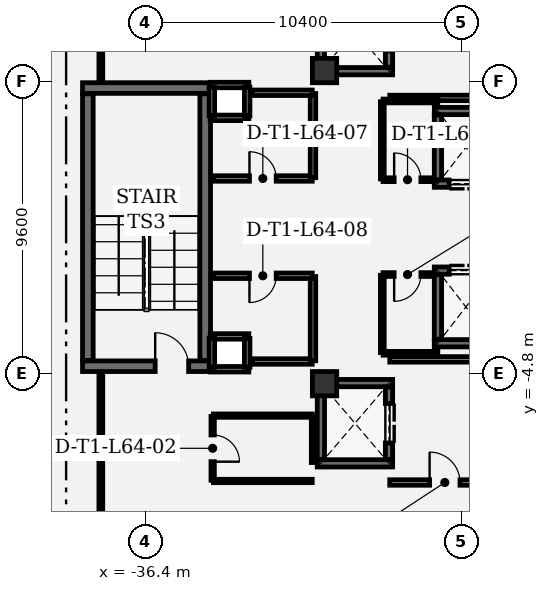
"""IFC4 building model, lengths in metres.
Left out: names, types, materials, properties, quantities, classifications, styles, units other than length and angle.
Written with IfcOpenShell. Run it as: python <this file> out.ifc"""

import sys

from ifc_helpers import new_model, si_unit, direction, frame, frame_2d, origin, origin_2d, place, context, subcontext, project, spatial, rectangle, extrude, element, fill, save


model = new_model("IFC4")
c1 = context("Model", 3, precision=1e-05, world=origin(), true_north=direction((0.0, 1.0)))
c2 = subcontext(c1, "Body", "Model", "MODEL_VIEW")
j1 = project(units=[si_unit("LENGTHUNIT", "METRE"), si_unit("PLANEANGLEUNIT", "RADIAN")], contexts=[c1])
p1 = place(None, origin())
s1 = spatial("IfcSite", under=j1, at=p1, CompositionType="ELEMENT")
p2 = place(p1, origin())
s2 = spatial("IfcBuilding", under=s1, at=p2, CompositionType="ELEMENT")
p3 = place(p2, frame((0.0, 0.0, 276.6)))
s3 = spatial("IfcBuildingStorey", under=s2, at=p3, CompositionType="ELEMENT", Elevation=276.6)
for number, where, z_axis, x_axis in (
    (1, (-30.5, 5.15, 0.0), (0.0, 0.0, 1.0), (1.0, 0.0, 0.0)),
    (2, (-30.5, -5.15, 0.0), (0.0, 0.0, 1.0), (1.0, 0.0, 0.0)),
):
    element("IfcColumn", number, at=place(p3, frame(where, z_axis=z_axis, x_axis=x_axis)), inside=s3, PredefinedType="COLUMN", context=c2, shape_type="SweptSolid", body=[
        extrude(rectangle(XDim=0.8, YDim=0.8, at=origin_2d()), origin(), (0.0, 0.0, 1.0), 4.2),
    ])
p4 = place(p3, frame((-38.46, -4.575, 0.0), z_axis=(0.0, 0.0, 1.0), x_axis=(1.0, 0.0, 0.0)))
e3 = element("IfcWall", 3, at=p4, inside=s3, PredefinedType="SHEAR", context=c2, shape_type="SweptSolid", body=[
    extrude(rectangle(XDim=4.21, YDim=0.35, at=frame_2d((2.105, 0.0))), origin(), (0.0, 0.0, 1.0), 3.91),
])
p5 = place(p4, frame((2.39, 0.0, 0.0)))
e4 = element("IfcOpeningElement", 4, at=p5, cuts=e3, PredefinedType="OPENING", context=c2, shape_type="SweptSolid", body=[
    extrude(rectangle(XDim=1.1, YDim=2.2, at=frame_2d((0.55, 1.1))), frame((0.0, 0.185, 0.0), z_axis=(0.0, -1.0, 0.0), x_axis=(1.0, 0.0, 0.0)), (0.0, 0.0, 1.0), 0.37),
])
p6 = place(p3, frame((-34.25, 4.575, 0.0), z_axis=(0.0, 0.0, 1.0), x_axis=(-1.0, 0.0, 0.0)))
e5 = element("IfcWall", 5, at=p6, inside=s3, PredefinedType="SHEAR", context=c2, shape_type="SweptSolid", body=[
    extrude(rectangle(XDim=4.21, YDim=0.35, at=frame_2d((2.105, 0.0))), origin(), (0.0, 0.0, 1.0), 3.91),
])
for number, where, z_axis, x_axis in (
    (6, (-34.425, -4.385, 0.0), (0.0, 0.0, 1.0), (0.0, 1.0, 0.0)),
    (7, (-38.285, 4.385, 0.0), (0.0, 0.0, 1.0), (0.0, -1.0, 0.0)),
):
    element("IfcWall", number, at=place(p3, frame(where, z_axis=z_axis, x_axis=x_axis)), inside=s3, PredefinedType="SHEAR", context=c2, shape_type="SweptSolid", body=[
        extrude(rectangle(XDim=8.77, YDim=0.35, at=frame_2d((4.385, 0.0))), origin(), (0.0, 0.0, 1.0), 3.91),
    ])
p7 = place(p3, frame((-28.26, 5.13, 0.0), z_axis=(0.0, 0.0, 1.0), x_axis=(-1.0, 0.0, 0.0)))
e8 = element("IfcWall", 8, at=p7, inside=s3, PredefinedType="SHEAR", context=c2, shape_type="SweptSolid", body=[
    extrude(rectangle(XDim=2.48, YDim=0.24, at=frame_2d((1.24, 0.0))), origin(), (0.0, 0.0, 1.0), 3.91),
])
p8 = place(p3, frame((-30.62, 5.262, 0.0), z_axis=(0.0, 0.0, 1.0), x_axis=(0.0, 1.0, 0.0)))
e9 = element("IfcWall", 9, at=p8, inside=s3, PredefinedType="SHEAR", context=c2, shape_type="SweptSolid", body=[
    extrude(rectangle(XDim=2.376, YDim=0.24, at=frame_2d((1.188, 0.0))), origin(), (0.0, 0.0, 1.0), 3.91),
])
p9 = place(p3, frame((-28.38, 7.638, 0.0), z_axis=(0.0, 0.0, 1.0), x_axis=(0.0, -1.0, 0.0)))
e10 = element("IfcWall", 10, at=p9, inside=s3, PredefinedType="SHEAR", context=c2, shape_type="SweptSolid", body=[
    extrude(rectangle(XDim=2.376, YDim=0.24, at=frame_2d((1.188, 0.0))), origin(), (0.0, 0.0, 1.0), 3.91),
])
p10 = place(p9, frame((0.538, 0.0, 0.0)))
e11 = element("IfcOpeningElement", 11, at=p10, cuts=e10, PredefinedType="OPENING", context=c2, shape_type="SweptSolid", body=[
    extrude(rectangle(XDim=1.3, YDim=2.3, at=frame_2d((0.65, 1.15))), frame((0.0, 0.13, 0.0), z_axis=(0.0, -1.0, 0.0), x_axis=(1.0, 0.0, 0.0)), (0.0, 0.0, 1.0), 0.26),
])
for number, where, z_axis, x_axis in (
    (12, (-28.26, -7.77, 0.0), (0.0, 0.0, 1.0), (-1.0, 0.0, 0.0)),
    (13, (-30.74, -5.13, 0.0), (0.0, 0.0, 1.0), (1.0, 0.0, 0.0)),
):
    element("IfcWall", number, at=place(p3, frame(where, z_axis=z_axis, x_axis=x_axis)), inside=s3, PredefinedType="SHEAR", context=c2, shape_type="SweptSolid", body=[
        extrude(rectangle(XDim=2.48, YDim=0.24, at=frame_2d((1.24, 0.0))), origin(), (0.0, 0.0, 1.0), 3.91),
    ])
p11 = place(p3, frame((-30.62, -7.638, 0.0), z_axis=(0.0, 0.0, 1.0), x_axis=(0.0, 1.0, 0.0)))
e14 = element("IfcWall", 14, at=p11, inside=s3, PredefinedType="SHEAR", context=c2, shape_type="SweptSolid", body=[
    extrude(rectangle(XDim=2.376, YDim=0.24, at=frame_2d((1.188, 0.0))), origin(), (0.0, 0.0, 1.0), 3.91),
])
p12 = place(p3, frame((-28.38, -5.262, 0.0), z_axis=(0.0, 0.0, 1.0), x_axis=(0.0, -1.0, 0.0)))
e15 = element("IfcWall", 15, at=p12, inside=s3, PredefinedType="SHEAR", context=c2, shape_type="SweptSolid", body=[
    extrude(rectangle(XDim=2.376, YDim=0.24, at=frame_2d((1.188, 0.0))), origin(), (0.0, 0.0, 1.0), 3.91),
])
p13 = place(p12, frame((0.538, 0.0, 0.0)))
e16 = element("IfcOpeningElement", 16, at=p13, cuts=e15, PredefinedType="OPENING", context=c2, shape_type="SweptSolid", body=[
    extrude(rectangle(XDim=1.3, YDim=2.3, at=frame_2d((0.65, 1.15))), frame((0.0, 0.13, 0.0), z_axis=(0.0, -1.0, 0.0), x_axis=(1.0, 0.0, 0.0)), (0.0, 0.0, 1.0), 0.26),
])
p14 = place(p3, frame((-24.81, 1.43, 0.0), z_axis=(0.0, 0.0, 1.0), x_axis=(-1.0, 0.0, 0.0)))
e17 = element("IfcWall", 17, at=p14, inside=s3, PredefinedType="SHEAR", context=c2, shape_type="SweptSolid", body=[
    extrude(rectangle(XDim=2.08, YDim=0.24, at=frame_2d((1.04, 0.0))), origin(), (0.0, 0.0, 1.0), 3.91),
])
p15 = place(p14, frame((0.49, 0.0, 0.0)))
e18 = element("IfcOpeningElement", 18, at=p15, cuts=e17, PredefinedType="OPENING", context=c2, shape_type="SweptSolid", body=[
    extrude(rectangle(XDim=1.1, YDim=2.2, at=frame_2d((0.55, 1.1))), frame((0.0, 0.13, 0.0), z_axis=(0.0, -1.0, 0.0), x_axis=(1.0, 0.0, 0.0)), (0.0, 0.0, 1.0), 0.26),
])
p16 = place(p3, frame((-26.89, 3.82, 0.0), z_axis=(0.0, 0.0, 1.0), x_axis=(1.0, 0.0, 0.0)))
e19 = element("IfcWall", 19, at=p16, inside=s3, PredefinedType="SHEAR", context=c2, shape_type="SweptSolid", body=[
    extrude(rectangle(XDim=2.08, YDim=0.24, at=frame_2d((1.04, 0.0))), origin(), (0.0, 0.0, 1.0), 3.91),
])
p17 = place(p3, frame((-26.77, 1.562, 0.0), z_axis=(0.0, 0.0, 1.0), x_axis=(0.0, 1.0, 0.0)))
e20 = element("IfcWall", 20, at=p17, inside=s3, PredefinedType="SHEAR", context=c2, shape_type="SweptSolid", body=[
    extrude(rectangle(XDim=2.126, YDim=0.24, at=frame_2d((1.063, 0.0))), origin(), (0.0, 0.0, 1.0), 3.91),
])
p18 = place(p3, frame((-24.81, -3.82, 0.0), z_axis=(0.0, 0.0, 1.0), x_axis=(-1.0, 0.0, 0.0)))
e21 = element("IfcWall", 21, at=p18, inside=s3, PredefinedType="SHEAR", context=c2, shape_type="SweptSolid", body=[
    extrude(rectangle(XDim=2.08, YDim=0.24, at=frame_2d((1.04, 0.0))), origin(), (0.0, 0.0, 1.0), 3.91),
])
p19 = place(p3, frame((-26.89, -1.43, 0.0), z_axis=(0.0, 0.0, 1.0), x_axis=(1.0, 0.0, 0.0)))
e22 = element("IfcWall", 22, at=p19, inside=s3, PredefinedType="SHEAR", context=c2, shape_type="SweptSolid", body=[
    extrude(rectangle(XDim=2.08, YDim=0.24, at=frame_2d((1.04, 0.0))), origin(), (0.0, 0.0, 1.0), 3.91),
])
p20 = place(p19, frame((0.49, 0.0, 0.0)))
e23 = element("IfcOpeningElement", 23, at=p20, cuts=e22, PredefinedType="OPENING", context=c2, shape_type="SweptSolid", body=[
    extrude(rectangle(XDim=1.1, YDim=2.2, at=frame_2d((0.55, 1.1))), frame((0.0, 0.13, 0.0), z_axis=(0.0, -1.0, 0.0), x_axis=(1.0, 0.0, 0.0)), (0.0, 0.0, 1.0), 0.26),
])
p21 = place(p3, frame((-26.77, -3.688, 0.0), z_axis=(0.0, 0.0, 1.0), x_axis=(0.0, 1.0, 0.0)))
e24 = element("IfcWall", 24, at=p21, inside=s3, PredefinedType="SHEAR", context=c2, shape_type="SweptSolid", body=[
    extrude(rectangle(XDim=2.126, YDim=0.24, at=frame_2d((1.063, 0.0))), origin(), (0.0, 0.0, 1.0), 3.91),
])
for number, where, z_axis, x_axis in (
    (25, (-32.99, 3.595, 0.0), (0.0, 0.0, 1.0), (-1.0, 0.0, 0.0)),
    (26, (-34.26, 4.675, 0.0), (0.0, 0.0, 1.0), (1.0, 0.0, 0.0)),
):
    element("IfcWall", number, at=place(p3, frame(where, z_axis=z_axis, x_axis=x_axis)), inside=s3, PredefinedType="PARTITIONING", context=c2, shape_type="SweptSolid", body=[
        extrude(rectangle(XDim=1.27, YDim=0.18, at=frame_2d((0.635, 0.0))), origin(), (0.0, 0.0, 1.0), 3.91),
    ])
for number, where, z_axis, x_axis in (
    (27, (-34.205, 3.66, 0.0), (0.0, 0.0, 1.0), (0.0, 1.0, 0.0)),
    (28, (-33.045, 4.61, 0.0), (0.0, 0.0, 1.0), (0.0, -1.0, 0.0)),
):
    element("IfcWall", number, at=place(p3, frame(where, z_axis=z_axis, x_axis=x_axis)), inside=s3, PredefinedType="PARTITIONING", context=c2, shape_type="SweptSolid", body=[
        extrude(rectangle(XDim=0.95, YDim=0.18, at=frame_2d((0.475, 0.0))), origin(), (0.0, 0.0, 1.0), 3.91),
    ])
for number, where, z_axis, x_axis in (
    (29, (-32.99, -4.675, 0.0), (0.0, 0.0, 1.0), (-1.0, 0.0, 0.0)),
    (30, (-34.26, -3.595, 0.0), (0.0, 0.0, 1.0), (1.0, 0.0, 0.0)),
):
    element("IfcWall", number, at=place(p3, frame(where, z_axis=z_axis, x_axis=x_axis)), inside=s3, PredefinedType="PARTITIONING", context=c2, shape_type="SweptSolid", body=[
        extrude(rectangle(XDim=1.27, YDim=0.18, at=frame_2d((0.635, 0.0))), origin(), (0.0, 0.0, 1.0), 3.91),
    ])
for number, where, z_axis, x_axis in (
    (31, (-34.205, -4.61, 0.0), (0.0, 0.0, 1.0), (0.0, 1.0, 0.0)),
    (32, (-33.045, -3.66, 0.0), (0.0, 0.0, 1.0), (0.0, -1.0, 0.0)),
):
    element("IfcWall", number, at=place(p3, frame(where, z_axis=z_axis, x_axis=x_axis)), inside=s3, PredefinedType="PARTITIONING", context=c2, shape_type="SweptSolid", body=[
        extrude(rectangle(XDim=0.95, YDim=0.18, at=frame_2d((0.475, 0.0))), origin(), (0.0, 0.0, 1.0), 3.91),
    ])
p22 = place(p3, frame((-28.355, 4.25, 0.0), z_axis=(0.0, 0.0, 1.0), x_axis=(1.0, 0.0, 0.0)))
e33 = element("IfcWall", 33, at=p22, inside=s3, PredefinedType="PARTITIONING", context=c2, shape_type="SweptSolid", body=[
    extrude(rectangle(XDim=3.622, YDim=0.18, at=frame_2d((1.811, 0.0))), origin(), (0.0, 0.0, 1.0), 3.91),
])
p23 = place(p3, frame((-28.355, -8.4, 0.0), z_axis=(0.0, 0.0, 1.0), x_axis=(1.0, 0.0, 0.0)))
e34 = element("IfcWall", 34, at=p23, inside=s3, PredefinedType="PARTITIONING", context=c2, shape_type="SweptSolid", body=[
    extrude(rectangle(XDim=3.622, YDim=0.18, at=frame_2d((1.811, 0.0))), origin(), (0.0, 0.0, 1.0), 3.529),
])
p24 = place(p23, frame((1.311, 0.0, 0.0)))
e35 = element("IfcOpeningElement", 35, at=p24, cuts=e34, PredefinedType="OPENING", context=c2, shape_type="SweptSolid", body=[
    extrude(rectangle(XDim=1.0, YDim=2.15, at=frame_2d((0.5, 1.075))), frame((0.0, 0.1, 0.0), z_axis=(0.0, -1.0, 0.0), x_axis=(1.0, 0.0, 0.0)), (0.0, 0.0, 1.0), 0.2),
])
p25 = place(p3, frame((-24.733, -4.35, 0.0), z_axis=(0.0, 0.0, 1.0), x_axis=(-1.0, 0.0, 0.0)))
e36 = element("IfcWall", 36, at=p25, inside=s3, PredefinedType="PARTITIONING", context=c2, shape_type="SweptSolid", body=[
    extrude(rectangle(XDim=3.622, YDim=0.18, at=frame_2d((1.811, 0.0))), origin(), (0.0, 0.0, 1.0), 3.91),
])
p26 = place(p3, frame((-34.18, -6.225, 0.0), z_axis=(0.0, 0.0, 1.0), x_axis=(0.0, -1.0, 0.0)))
e37 = element("IfcWall", 37, at=p26, inside=s3, PredefinedType="PARTITIONING", context=c2, shape_type="SweptSolid", body=[
    extrude(rectangle(XDim=2.1, YDim=0.11, at=frame_2d((1.05, 0.0))), origin(), (0.0, 0.0, 1.0), 3.91),
])
p27 = place(p26, frame((0.61, 0.0, 0.0)))
e38 = element("IfcOpeningElement", 38, at=p27, cuts=e37, PredefinedType="OPENING", context=c2, shape_type="SweptSolid", body=[
    extrude(rectangle(XDim=0.88, YDim=2.1, at=frame_2d((0.44, 1.05))), frame((0.0, 0.065, 0.0), z_axis=(0.0, -1.0, 0.0), x_axis=(1.0, 0.0, 0.0)), (0.0, 0.0, 1.0), 0.13),
])
p28 = place(p3, frame((-34.155, -8.35, 0.0), z_axis=(0.0, 0.0, 1.0), x_axis=(1.0, 0.0, 0.0)))
e39 = element("IfcWall", 39, at=p28, inside=s3, PredefinedType="PARTITIONING", context=c2, shape_type="SweptSolid", body=[
    extrude(rectangle(XDim=3.25, YDim=0.11, at=frame_2d((1.625, 0.0))), origin(), (0.0, 0.0, 1.0), 3.529),
])
p29 = place(p3, frame((-30.88, -7.743, 0.0), z_axis=(0.0, 0.0, 1.0), x_axis=(0.0, 1.0, 0.0)))
e40 = element("IfcWall", 40, at=p29, inside=s3, PredefinedType="PARTITIONING", context=c2, shape_type="SweptSolid", body=[
    extrude(rectangle(XDim=1.518, YDim=0.11, at=frame_2d((0.759, 0.0))), origin(), (0.0, 0.0, 1.0), 3.91),
])
p30 = place(p3, frame((-30.905, -6.2, 0.0), z_axis=(0.0, 0.0, 1.0), x_axis=(-1.0, 0.0, 0.0)))
e41 = element("IfcWall", 41, at=p30, inside=s3, PredefinedType="PARTITIONING", context=c2, shape_type="SweptSolid", body=[
    extrude(rectangle(XDim=3.25, YDim=0.11, at=frame_2d((1.625, 0.0))), origin(), (0.0, 0.0, 1.0), 3.91),
])
p31 = place(p3, frame((-28.6, 4.125, 0.0), z_axis=(0.0, 0.0, 1.0), x_axis=(0.0, -1.0, 0.0)))
e42 = element("IfcWall", 42, at=p31, inside=s3, PredefinedType="PARTITIONING", context=c2, shape_type="SweptSolid", body=[
    extrude(rectangle(XDim=2.54, YDim=0.125, at=frame_2d((1.27, 0.0))), origin(), (0.0, 0.0, 1.0), 3.91),
])
p32 = place(p3, frame((-28.575, 1.56, 0.0), z_axis=(0.0, 0.0, 1.0), x_axis=(1.0, 0.0, 0.0)))
e43 = element("IfcWall", 43, at=p32, inside=s3, PredefinedType="PARTITIONING", context=c2, shape_type="SweptSolid", body=[
    extrude(rectangle(XDim=1.609, YDim=0.125, at=frame_2d((0.805, 0.0))), origin(), (0.0, 0.0, 1.0), 3.91),
])
p33 = place(p32, frame((0.365, 0.0, 0.0)))
e44 = element("IfcOpeningElement", 44, at=p33, cuts=e43, PredefinedType="OPENING", context=c2, shape_type="SweptSolid", body=[
    extrude(rectangle(XDim=0.88, YDim=2.1, at=frame_2d((0.44, 1.05))), frame((0.0, 0.073, 0.0), z_axis=(0.0, -1.0, 0.0), x_axis=(1.0, 0.0, 0.0)), (0.0, 0.0, 1.0), 0.145),
])
p34 = place(p3, frame((-26.775, 4.15, 0.0), z_axis=(0.0, 0.0, 1.0), x_axis=(-1.0, 0.0, 0.0)))
e45 = element("IfcWall", 45, at=p34, inside=s3, PredefinedType="PARTITIONING", context=c2, shape_type="SweptSolid", body=[
    extrude(rectangle(XDim=1.8, YDim=0.125, at=frame_2d((0.9, 0.0))), origin(), (0.0, 0.0, 1.0), 3.91),
])
p35 = place(p3, frame((-28.6, -1.585, 0.0), z_axis=(0.0, 0.0, 1.0), x_axis=(0.0, -1.0, 0.0)))
e46 = element("IfcWall", 46, at=p35, inside=s3, PredefinedType="PARTITIONING", context=c2, shape_type="SweptSolid", body=[
    extrude(rectangle(XDim=2.54, YDim=0.125, at=frame_2d((1.27, 0.0))), origin(), (0.0, 0.0, 1.0), 3.91),
])
p36 = place(p3, frame((-28.575, -4.15, 0.0), z_axis=(0.0, 0.0, 1.0), x_axis=(1.0, 0.0, 0.0)))
e47 = element("IfcWall", 47, at=p36, inside=s3, PredefinedType="PARTITIONING", context=c2, shape_type="SweptSolid", body=[
    extrude(rectangle(XDim=1.8, YDim=0.125, at=frame_2d((0.9, 0.0))), origin(), (0.0, 0.0, 1.0), 3.91),
])
p37 = place(p3, frame((-26.966, -1.56, 0.0), z_axis=(0.0, 0.0, 1.0), x_axis=(-1.0, 0.0, 0.0)))
e48 = element("IfcWall", 48, at=p37, inside=s3, PredefinedType="PARTITIONING", context=c2, shape_type="SweptSolid", body=[
    extrude(rectangle(XDim=1.609, YDim=0.125, at=frame_2d((0.805, 0.0))), origin(), (0.0, 0.0, 1.0), 3.91),
])
p38 = place(p37, frame((0.365, 0.0, 0.0)))
e49 = element("IfcOpeningElement", 49, at=p38, cuts=e48, PredefinedType="OPENING", context=c2, shape_type="SweptSolid", body=[
    extrude(rectangle(XDim=0.88, YDim=2.1, at=frame_2d((0.44, 1.05))), frame((0.0, 0.073, 0.0), z_axis=(0.0, -1.0, 0.0), x_axis=(1.0, 0.0, 0.0)), (0.0, 0.0, 1.0), 0.145),
])
p39 = place(p3, frame((-34.155, 1.6, 0.0), z_axis=(0.0, 0.0, 1.0), x_axis=(1.0, 0.0, 0.0)))
e50 = element("IfcWall", 50, at=p39, inside=s3, PredefinedType="PARTITIONING", context=c2, shape_type="SweptSolid", body=[
    extrude(rectangle(XDim=3.25, YDim=0.18, at=frame_2d((1.625, 0.0))), origin(), (0.0, 0.0, 1.0), 3.91),
])
p40 = place(p39, frame((1.185, 0.0, 0.0)))
e51 = element("IfcOpeningElement", 51, at=p40, cuts=e50, PredefinedType="OPENING", context=c2, shape_type="SweptSolid", body=[
    extrude(rectangle(XDim=0.88, YDim=2.1, at=frame_2d((0.44, 1.05))), frame((0.0, 0.1, 0.0), z_axis=(0.0, -1.0, 0.0), x_axis=(1.0, 0.0, 0.0)), (0.0, 0.0, 1.0), 0.2),
])
p41 = place(p3, frame((-30.88, 1.625, 0.0), z_axis=(0.0, 0.0, 1.0), x_axis=(0.0, 1.0, 0.0)))
e52 = element("IfcWall", 52, at=p41, inside=s3, PredefinedType="PARTITIONING", context=c2, shape_type="SweptSolid", body=[
    extrude(rectangle(XDim=2.77, YDim=0.18, at=frame_2d((1.385, 0.0))), origin(), (0.0, 0.0, 1.0), 3.91),
])
for number, where, z_axis, x_axis in (
    (53, (-30.905, 4.42, 0.0), (0.0, 0.0, 1.0), (-1.0, 0.0, 0.0)),
    (54, (-32.88, -4.42, 0.0), (0.0, 0.0, 1.0), (1.0, 0.0, 0.0)),
):
    element("IfcWall", number, at=place(p3, frame(where, z_axis=z_axis, x_axis=x_axis)), inside=s3, PredefinedType="PARTITIONING", context=c2, shape_type="SweptSolid", body=[
        extrude(rectangle(XDim=1.975, YDim=0.18, at=frame_2d((0.988, 0.0))), origin(), (0.0, 0.0, 1.0), 3.91),
    ])
p42 = place(p3, frame((-30.88, -4.395, 0.0), z_axis=(0.0, 0.0, 1.0), x_axis=(0.0, 1.0, 0.0)))
e55 = element("IfcWall", 55, at=p42, inside=s3, PredefinedType="PARTITIONING", context=c2, shape_type="SweptSolid", body=[
    extrude(rectangle(XDim=2.77, YDim=0.18, at=frame_2d((1.385, 0.0))), origin(), (0.0, 0.0, 1.0), 3.91),
])
p43 = place(p3, frame((-30.905, -1.6, 0.0), z_axis=(0.0, 0.0, 1.0), x_axis=(-1.0, 0.0, 0.0)))
e56 = element("IfcWall", 56, at=p43, inside=s3, PredefinedType="PARTITIONING", context=c2, shape_type="SweptSolid", body=[
    extrude(rectangle(XDim=3.25, YDim=0.18, at=frame_2d((1.625, 0.0))), origin(), (0.0, 0.0, 1.0), 3.91),
])
p44 = place(p43, frame((1.185, 0.0, 0.0)))
e57 = element("IfcOpeningElement", 57, at=p44, cuts=e56, PredefinedType="OPENING", context=c2, shape_type="SweptSolid", body=[
    extrude(rectangle(XDim=0.88, YDim=2.1, at=frame_2d((0.44, 1.05))), frame((0.0, 0.1, 0.0), z_axis=(0.0, -1.0, 0.0), x_axis=(1.0, 0.0, 0.0)), (0.0, 0.0, 1.0), 0.2),
])
for number, where, z_axis, x_axis in (
    (58, (-37.858, -4.783, 0.0), (0.0, 0.0, 1.0), (0.0, -1.0, 0.0)),
    (59, (-37.858, 11.265, 0.0), (0.0, 0.0, 1.0), (0.0, -1.0, 0.0)),
):
    element("IfcWall", number, at=place(p3, frame(where, z_axis=z_axis, x_axis=x_axis)), inside=s3, PredefinedType="PARTITIONING", context=c2, shape_type="SweptSolid", body=[
        extrude(rectangle(XDim=6.482, YDim=0.125, at=frame_2d((3.241, 0.0))), origin(), (0.0, 0.0, 1.0), 3.91),
    ])
p45 = place(p5, origin())
e60 = element("IfcDoor", 60, at=p45, inside=s3, OperationType="SINGLE_SWING_LEFT", PredefinedType="DOOR", context=c2, shape_type="SweptSolid", body=[
    extrude(rectangle(XDim=1.1, YDim=2.2, at=frame_2d((0.55, 1.1))), frame((0.0, 0.025, 0.0), z_axis=(0.0, -1.0, 0.0), x_axis=(1.0, 0.0, 0.0)), (0.0, 0.0, 1.0), 0.05),
])
fill(e4, e60)
p46 = place(p13, origin())
e61 = element("IfcDoor", 61, at=p46, inside=s3, OperationType="DOUBLE_DOOR_SLIDING", PredefinedType="DOOR", context=c2, shape_type="SweptSolid", body=[
    extrude(rectangle(XDim=1.3, YDim=2.3, at=frame_2d((0.65, 1.15))), frame((0.0, 0.025, 0.0), z_axis=(0.0, -1.0, 0.0), x_axis=(1.0, 0.0, 0.0)), (0.0, 0.0, 1.0), 0.05),
])
fill(e16, e61)
p47 = place(p15, origin())
e62 = element("IfcDoor", 62, at=p47, inside=s3, OperationType="DOUBLE_DOOR_SLIDING", PredefinedType="DOOR", context=c2, shape_type="SweptSolid", body=[
    extrude(rectangle(XDim=1.1, YDim=2.2, at=frame_2d((0.55, 1.1))), frame((0.0, 0.025, 0.0), z_axis=(0.0, -1.0, 0.0), x_axis=(1.0, 0.0, 0.0)), (0.0, 0.0, 1.0), 0.05),
])
fill(e18, e62)
p48 = place(p20, origin())
e63 = element("IfcDoor", 63, at=p48, inside=s3, OperationType="DOUBLE_DOOR_SLIDING", PredefinedType="DOOR", context=c2, shape_type="SweptSolid", body=[
    extrude(rectangle(XDim=1.1, YDim=2.2, at=frame_2d((0.55, 1.1))), frame((0.0, 0.025, 0.0), z_axis=(0.0, -1.0, 0.0), x_axis=(1.0, 0.0, 0.0)), (0.0, 0.0, 1.0), 0.05),
])
fill(e23, e63)
p49 = place(p27, origin())
e64 = element("IfcDoor", 64, at=p49, inside=s3, OperationType="SINGLE_SWING_RIGHT", PredefinedType="DOOR", context=c2, shape_type="SweptSolid", body=[
    extrude(rectangle(XDim=0.88, YDim=2.1, at=frame_2d((0.44, 1.05))), frame((0.0, 0.025, 0.0), z_axis=(0.0, -1.0, 0.0), x_axis=(1.0, 0.0, 0.0)), (0.0, 0.0, 1.0), 0.05),
])
fill(e38, e64)
p50 = place(p33, origin())
e65 = element("IfcDoor", 65, at=p50, inside=s3, OperationType="SINGLE_SWING_LEFT", PredefinedType="DOOR", context=c2, shape_type="SweptSolid", body=[
    extrude(rectangle(XDim=0.88, YDim=2.1, at=frame_2d((0.44, 1.05))), frame((0.0, 0.025, 0.0), z_axis=(0.0, -1.0, 0.0), x_axis=(1.0, 0.0, 0.0)), (0.0, 0.0, 1.0), 0.05),
])
fill(e44, e65)
p51 = place(p38, origin())
e66 = element("IfcDoor", 66, at=p51, inside=s3, OperationType="SINGLE_SWING_RIGHT", PredefinedType="DOOR", context=c2, shape_type="SweptSolid", body=[
    extrude(rectangle(XDim=0.88, YDim=2.1, at=frame_2d((0.44, 1.05))), frame((0.0, 0.025, 0.0), z_axis=(0.0, -1.0, 0.0), x_axis=(1.0, 0.0, 0.0)), (0.0, 0.0, 1.0), 0.05),
])
fill(e49, e66)
p52 = place(p40, origin())
e67 = element("IfcDoor", 67, at=p52, inside=s3, OperationType="SINGLE_SWING_LEFT", PredefinedType="DOOR", context=c2, shape_type="SweptSolid", body=[
    extrude(rectangle(XDim=0.88, YDim=2.1, at=frame_2d((0.44, 1.05))), frame((0.0, 0.025, 0.0), z_axis=(0.0, -1.0, 0.0), x_axis=(1.0, 0.0, 0.0)), (0.0, 0.0, 1.0), 0.05),
])
fill(e51, e67)
p53 = place(p44, origin())
e68 = element("IfcDoor", 68, at=p53, inside=s3, OperationType="SINGLE_SWING_RIGHT", PredefinedType="DOOR", context=c2, shape_type="SweptSolid", body=[
    extrude(rectangle(XDim=0.88, YDim=2.1, at=frame_2d((0.44, 1.05))), frame((0.0, 0.025, 0.0), z_axis=(0.0, -1.0, 0.0), x_axis=(1.0, 0.0, 0.0)), (0.0, 0.0, 1.0), 0.05),
])
fill(e57, e68)
p54 = place(p24, origin())
e69 = element("IfcDoor", 69, at=p54, inside=s3, OperationType="SINGLE_SWING_LEFT", PredefinedType="DOOR", context=c2, shape_type="SweptSolid", body=[
    extrude(rectangle(XDim=1.0, YDim=2.15, at=frame_2d((0.5, 1.075))), frame((0.0, 0.025, 0.0), z_axis=(0.0, -1.0, 0.0), x_axis=(1.0, 0.0, 0.0)), (0.0, 0.0, 1.0), 0.05),
])
fill(e35, e69)
save(model, sys.argv[1])
